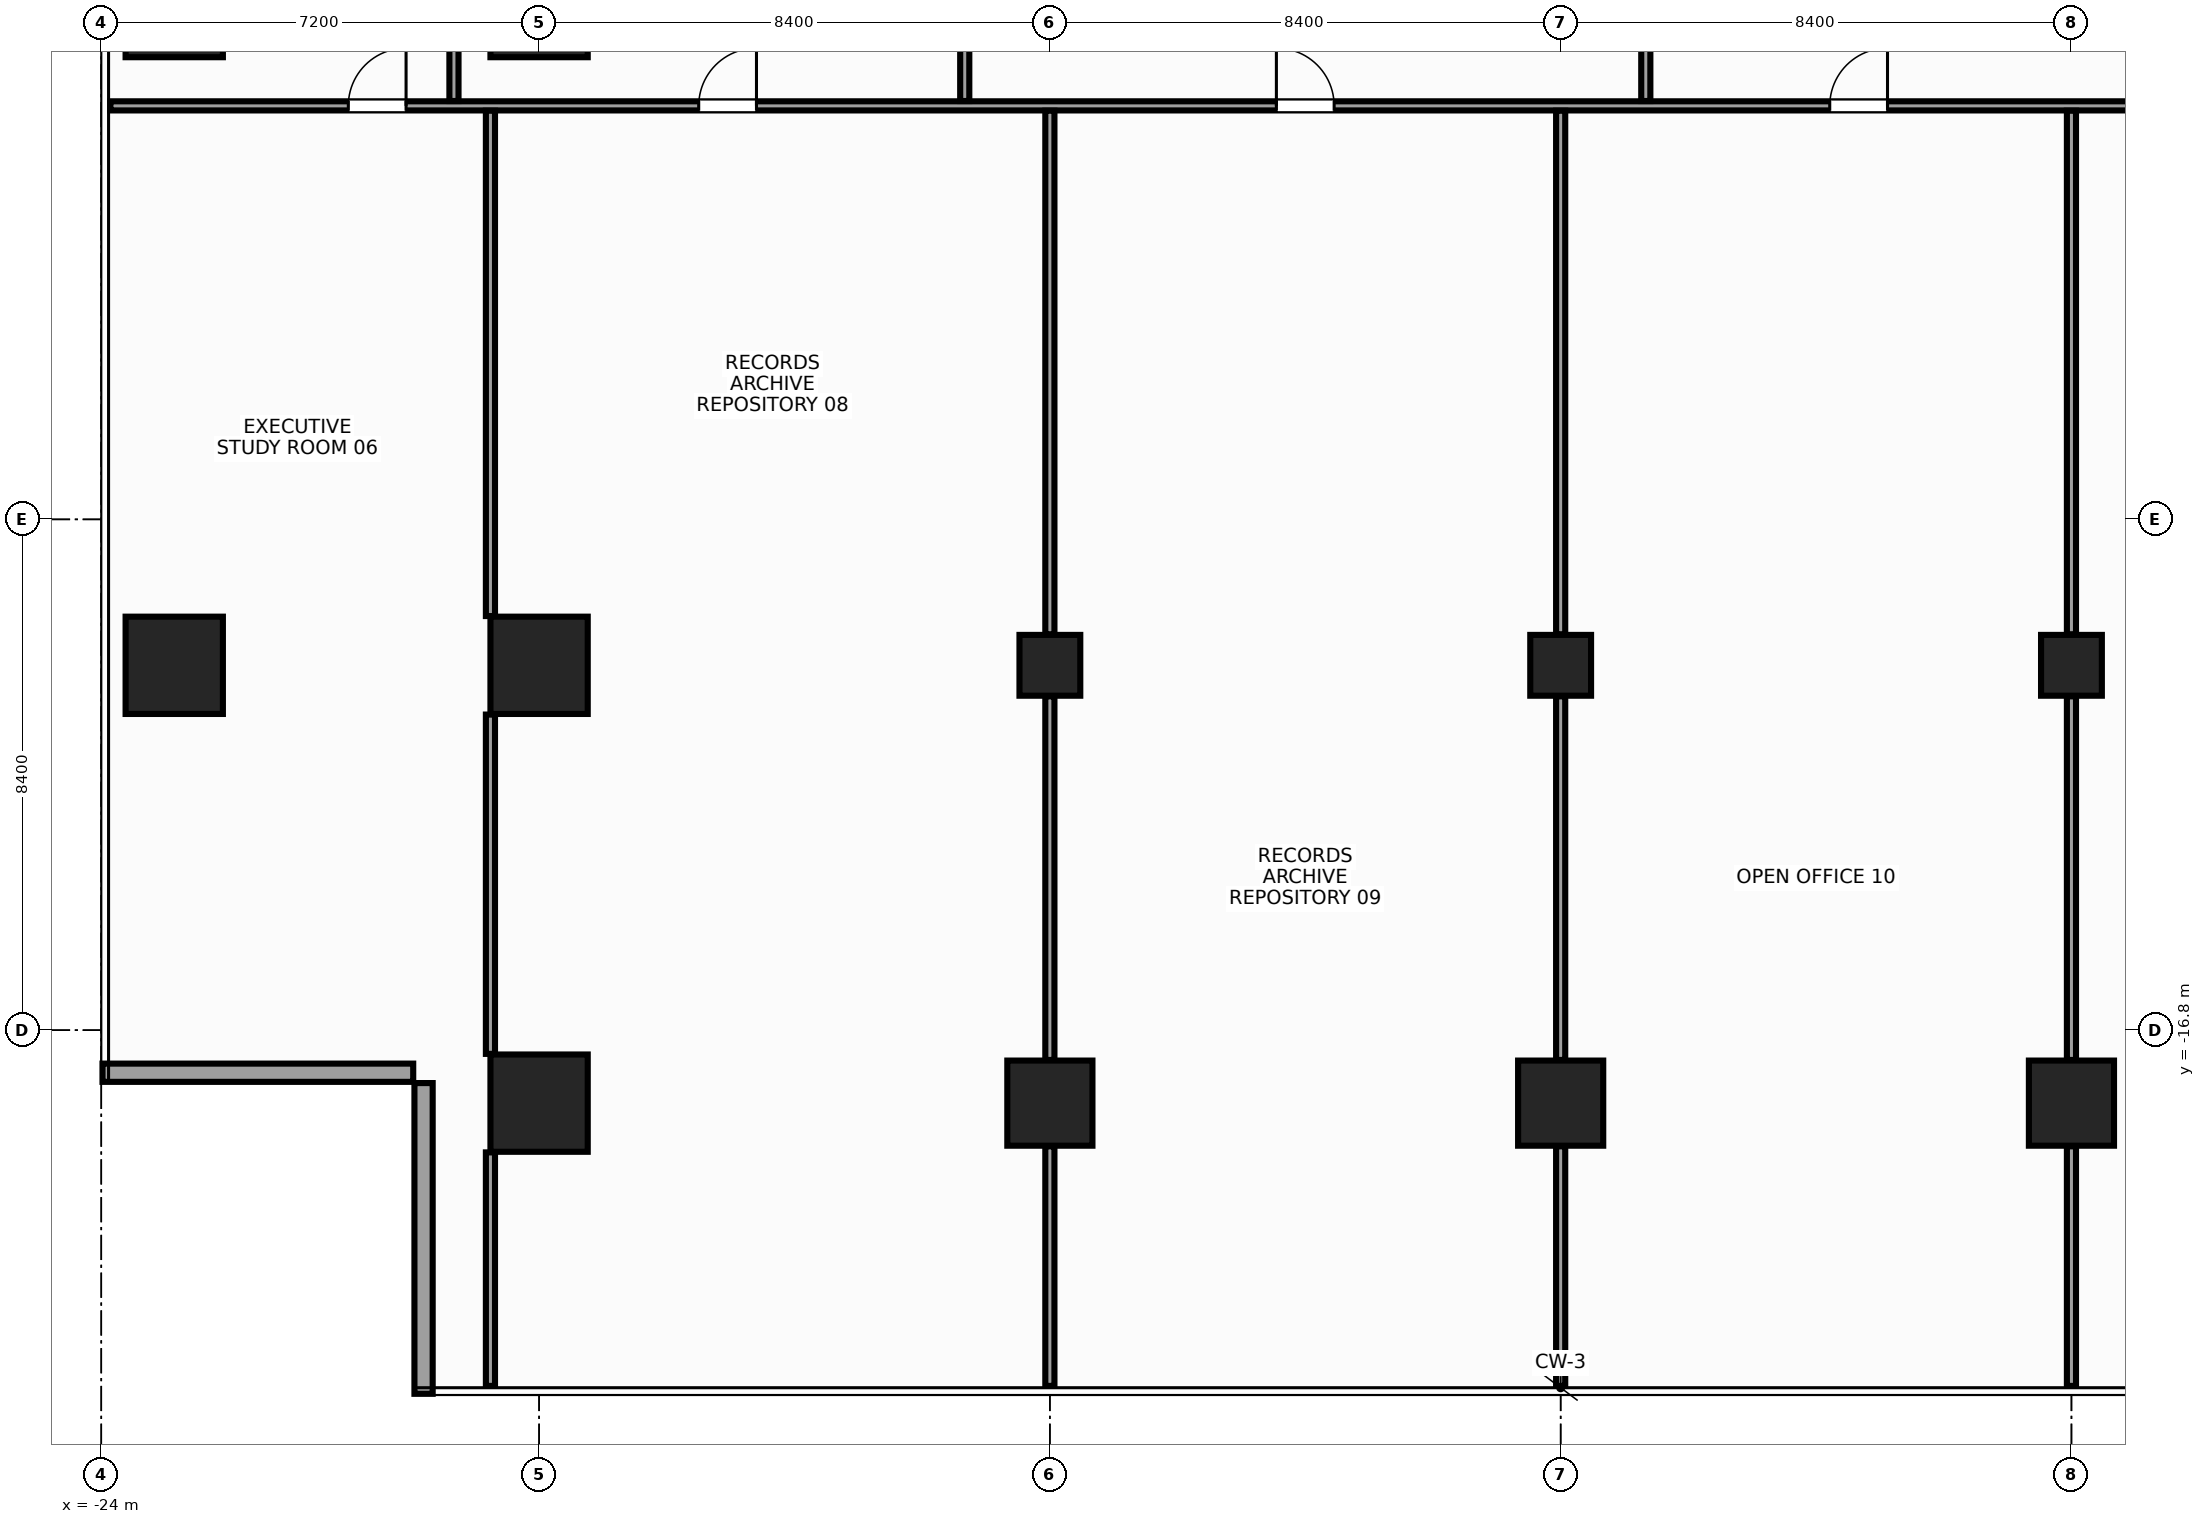
"""IFC4 building model, lengths in metres.
Left out: names, types, materials, properties, quantities, classifications, styles, units other than length and angle.
Written with IfcOpenShell. Run it as: python <this file> out.ifc"""

import sys

from ifc_helpers import new_model, si_unit, direction, frame, frame_2d, origin, origin_2d, place, context, subcontext, project, spatial, rectangle, hollow_rectangle, extrude, source, transform, mapped, element, fill, save


model = new_model("IFC4")
c1 = context("Model", 3, precision=1e-05, world=origin(), true_north=direction((0.0, 1.0)))
c2 = subcontext(c1, "Body", "Model", "MODEL_VIEW")
j1 = project(units=[si_unit("LENGTHUNIT", "METRE"), si_unit("PLANEANGLEUNIT", "RADIAN")], contexts=[c1])
p1 = place(None, origin())
s1 = spatial("IfcSite", under=j1, at=p1, CompositionType="ELEMENT")
p2 = place(p1, origin())
s2 = spatial("IfcBuilding", under=s1, at=p2, CompositionType="ELEMENT")
p3 = place(p2, frame((0.0, 0.0, 149.6)))
s3 = spatial("IfcBuildingStorey", under=s2, at=p3, CompositionType="ELEMENT", Elevation=149.6)
m1 = source(origin(), c2, "Body", "SweptSolid", [
    extrude(rectangle(XDim=1.6, YDim=1.6, at=origin_2d()), origin(), (0.0, 0.0, 1.0), 3.6),
])
for number, where, z_axis, x_axis in (
    (1, (-16.8, -18.0, 0.0), (0.0, 0.0, 1.0), (1.0, 0.0, 0.0)),
    (2, (-16.8, -10.8, 0.0), (0.0, 0.0, 1.0), (1.0, 0.0, 0.0)),
    (3, (-16.8, 0.0, 0.0), (0.0, 0.0, 1.0), (1.0, 0.0, 0.0)),
    (4, (-22.8, -10.8, 0.0), (0.0, 0.0, 1.0), (1.0, 0.0, 0.0)),
    (5, (-22.8, 0.0, 0.0), (0.0, 0.0, 1.0), (1.0, 0.0, 0.0)),
):
    element("IfcColumn", number, at=place(p3, frame(where, z_axis=z_axis, x_axis=x_axis)), inside=s3, PredefinedType="COLUMN", context=c2, shape_type="MappedRepresentation", body=[
        mapped(m1, transform((0.0, 0.0, 0.0), x_axis=(1.0, 0.0, 0.0), y_axis=(0.0, 1.0, 0.0), z_axis=(0.0, 0.0, 1.0), scale=1.0)),
    ])
m2 = source(origin(), c2, "Body", "SweptSolid", [
    extrude(rectangle(XDim=1.4, YDim=1.4, at=origin_2d()), origin(), (0.0, 0.0, 1.0), 3.6),
])
p4 = place(p3, frame((-8.4, -18.0, 0.0), z_axis=(0.0, 0.0, 1.0), x_axis=(1.0, 0.0, 0.0)))
e6 = element("IfcColumn", 6, at=p4, inside=s3, PredefinedType="COLUMN", context=c2, shape_type="MappedRepresentation", body=[
    mapped(m2, transform((0.0, 0.0, 0.0), x_axis=(1.0, 0.0, 0.0), y_axis=(0.0, 1.0, 0.0), z_axis=(0.0, 0.0, 1.0), scale=1.0)),
])
m3 = source(origin(), c2, "Body", "SweptSolid", [
    extrude(hollow_rectangle(XDim=1.0, YDim=1.0, WallThickness=0.045, at=origin_2d()), origin(), (0.0, 0.0, 1.0), 3.6),
])
p5 = place(p3, frame((-8.4, -10.8, 0.0), z_axis=(0.0, 0.0, 1.0), x_axis=(1.0, 0.0, 0.0)))
e7 = element("IfcColumn", 7, at=p5, inside=s3, PredefinedType="COLUMN", context=c2, shape_type="MappedRepresentation", body=[
    mapped(m3, transform((0.0, 0.0, 0.0), x_axis=(1.0, 0.0, 0.0), y_axis=(0.0, 1.0, 0.0), z_axis=(0.0, 0.0, 1.0), scale=1.0)),
])
p6 = place(p3, frame((8.4, -18.0, 0.0), z_axis=(0.0, 0.0, 1.0), x_axis=(1.0, 0.0, 0.0)))
e8 = element("IfcColumn", 8, at=p6, inside=s3, PredefinedType="COLUMN", context=c2, shape_type="MappedRepresentation", body=[
    mapped(m2, transform((0.0, 0.0, 0.0), x_axis=(1.0, 0.0, 0.0), y_axis=(0.0, 1.0, 0.0), z_axis=(0.0, 0.0, 1.0), scale=1.0)),
])
p7 = place(p3, frame((8.4, -10.8, 0.0), z_axis=(0.0, 0.0, 1.0), x_axis=(1.0, 0.0, 0.0)))
e9 = element("IfcColumn", 9, at=p7, inside=s3, PredefinedType="COLUMN", context=c2, shape_type="MappedRepresentation", body=[
    mapped(m3, transform((0.0, 0.0, 0.0), x_axis=(1.0, 0.0, 0.0), y_axis=(0.0, 1.0, 0.0), z_axis=(0.0, 0.0, 1.0), scale=1.0)),
])
p8 = place(p3, frame((0.0, -18.0, 0.0), z_axis=(0.0, 0.0, 1.0), x_axis=(1.0, 0.0, 0.0)))
e10 = element("IfcColumn", 10, at=p8, inside=s3, PredefinedType="COLUMN", context=c2, shape_type="MappedRepresentation", body=[
    mapped(m2, transform((0.0, 0.0, 0.0), x_axis=(1.0, 0.0, 0.0), y_axis=(0.0, 1.0, 0.0), z_axis=(0.0, 0.0, 1.0), scale=1.0)),
])
m4 = source(origin(), c2, "Body", "SweptSolid", [
    extrude(rectangle(XDim=1.0, YDim=1.0, at=origin_2d()), origin(), (0.0, 0.0, 1.0), 3.6),
])
p9 = place(p3, frame((0.0, -10.8, 0.0), z_axis=(0.0, 0.0, 1.0), x_axis=(1.0, 0.0, 0.0)))
e11 = element("IfcColumn", 11, at=p9, inside=s3, PredefinedType="COLUMN", context=c2, shape_type="MappedRepresentation", body=[
    mapped(m4, transform((0.0, 0.0, 0.0), x_axis=(1.0, 0.0, 0.0), y_axis=(0.0, 1.0, 0.0), z_axis=(0.0, 0.0, 1.0), scale=1.0)),
])
m5 = source(origin(), c2, "Body", "SweptSolid", [
    extrude(rectangle(XDim=5.11, YDim=0.3, at=frame_2d((2.555, 0.0))), origin(), (0.0, 0.0, 1.0), 2.76),
])
p10 = place(p3, frame((-23.98, -17.5, 0.0), z_axis=(0.0, 0.0, 1.0), x_axis=(1.0, 0.0, 0.0)))
e12 = element("IfcWall", 12, at=p10, inside=s3, PredefinedType="STANDARD", context=c2, shape_type="MappedRepresentation", body=[
    mapped(m5, transform((0.0, 0.0, 0.0), x_axis=(1.0, 0.0, 0.0), y_axis=(0.0, 1.0, 0.0), z_axis=(0.0, 0.0, 1.0), scale=1.0)),
])
m6 = source(origin(), c2, "Body", "SweptSolid", [
    extrude(rectangle(XDim=5.11, YDim=0.3, at=frame_2d((2.555, 0.0))), origin(), (0.0, 0.0, 1.0), 2.76),
])
p11 = place(p3, frame((-18.7, -17.67, 0.0), z_axis=(0.0, 0.0, 1.0), x_axis=(0.0, -1.0, 0.0)))
e13 = element("IfcWall", 13, at=p11, inside=s3, PredefinedType="STANDARD", context=c2, shape_type="MappedRepresentation", body=[
    mapped(m6, transform((0.0, 0.0, 0.0), x_axis=(1.0, 0.0, 0.0), y_axis=(0.0, 1.0, 0.0), z_axis=(0.0, 0.0, 1.0), scale=1.0)),
])
m7 = source(origin(), c2, "Body", "SweptSolid", [
    extrude(rectangle(XDim=34.895, YDim=0.15, at=frame_2d((17.448, 0.0))), origin(), (0.0, 0.0, 1.0), 2.765),
])
p12 = place(p3, frame((-23.85, -1.6, 0.0), z_axis=(0.0, 0.0, 1.0), x_axis=(1.0, 0.0, 0.0)))
e14 = element("IfcWall", 14, at=p12, inside=s3, PredefinedType="PARTITIONING", context=c2, shape_type="MappedRepresentation", body=[
    mapped(m7, transform((0.0, 0.0, 0.0), x_axis=(1.0, 0.0, 0.0), y_axis=(0.0, 1.0, 0.0), z_axis=(0.0, 0.0, 1.0), scale=1.0)),
])
p13 = place(p12, frame((3.913, 0.0, 0.0)))
e15 = element("IfcOpeningElement", 15, at=p13, cuts=e14, PredefinedType="OPENING", context=c2, shape_type="SweptSolid", body=[
    extrude(rectangle(XDim=0.95, YDim=2.15, at=frame_2d((0.475, 1.075))), frame((0.0, 0.087, 0.0), z_axis=(0.0, -1.0, 0.0), x_axis=(1.0, 0.0, 0.0)), (0.0, 0.0, 1.0), 0.174),
])
p14 = place(p12, frame((9.675, 0.0, 0.0)))
e16 = element("IfcOpeningElement", 16, at=p14, cuts=e14, PredefinedType="OPENING", context=c2, shape_type="SweptSolid", body=[
    extrude(rectangle(XDim=0.95, YDim=2.15, at=frame_2d((0.475, 1.075))), frame((0.0, 0.087, 0.0), z_axis=(0.0, -1.0, 0.0), x_axis=(1.0, 0.0, 0.0)), (0.0, 0.0, 1.0), 0.174),
])
p15 = place(p12, frame((19.175, 0.0, 0.0)))
e17 = element("IfcOpeningElement", 17, at=p15, cuts=e14, PredefinedType="OPENING", context=c2, shape_type="SweptSolid", body=[
    extrude(rectangle(XDim=0.95, YDim=2.15, at=frame_2d((0.475, 1.075))), frame((0.0, 0.087, 0.0), z_axis=(0.0, -1.0, 0.0), x_axis=(1.0, 0.0, 0.0)), (0.0, 0.0, 1.0), 0.174),
])
p16 = place(p12, frame((28.275, 0.0, 0.0)))
e18 = element("IfcOpeningElement", 18, at=p16, cuts=e14, PredefinedType="OPENING", context=c2, shape_type="SweptSolid", body=[
    extrude(rectangle(XDim=0.95, YDim=2.15, at=frame_2d((0.475, 1.075))), frame((0.0, 0.087, 0.0), z_axis=(0.0, -1.0, 0.0), x_axis=(1.0, 0.0, 0.0)), (0.0, 0.0, 1.0), 0.174),
])
m8 = source(origin(), c2, "Body", "SweptSolid", [
    extrude(rectangle(XDim=9.165, YDim=0.15, at=frame_2d((4.583, 0.0))), origin(), (0.0, 0.0, 1.0), 2.915),
])
p17 = place(p3, frame((-18.2, -1.52, 0.0), z_axis=(0.0, 0.0, 1.0), x_axis=(0.0, 1.0, 0.0)))
e19 = element("IfcWall", 19, at=p17, inside=s3, PredefinedType="PARTITIONING", context=c2, shape_type="MappedRepresentation", body=[
    mapped(m8, transform((0.0, 0.0, 0.0), x_axis=(1.0, 0.0, 0.0), y_axis=(0.0, 1.0, 0.0), z_axis=(0.0, 0.0, 1.0), scale=1.0)),
])
m9 = source(origin(), c2, "Body", "SweptSolid", [
    extrude(rectangle(XDim=9.165, YDim=0.15, at=frame_2d((4.583, 0.0))), origin(), (0.0, 0.0, 1.0), 2.665),
])
for number, where, z_axis, x_axis in (
    (20, (-9.8, -1.52, 0.0), (0.0, 0.0, 1.0), (0.0, 1.0, 0.0)),
    (21, (1.4, -1.52, 0.0), (0.0, 0.0, 1.0), (0.0, 1.0, 0.0)),
):
    element("IfcWall", number, at=place(p3, frame(where, z_axis=z_axis, x_axis=x_axis)), inside=s3, PredefinedType="PARTITIONING", context=c2, shape_type="MappedRepresentation", body=[
        mapped(m9, transform((0.0, 0.0, 0.0), x_axis=(1.0, 0.0, 0.0), y_axis=(0.0, 1.0, 0.0), z_axis=(0.0, 0.0, 1.0), scale=1.0)),
    ])
m10 = source(origin(), c2, "Body", "SweptSolid", [
    extrude(rectangle(XDim=3.84, YDim=0.15, at=frame_2d((1.92, 0.0))), origin(), (0.0, 0.0, 1.0), 3.38),
])
p18 = place(p3, frame((-17.6, -22.65, 0.0), z_axis=(0.0, 0.0, 1.0), x_axis=(0.0, 1.0, 0.0)))
e22 = element("IfcWall", 22, at=p18, inside=s3, PredefinedType="PARTITIONING", context=c2, shape_type="MappedRepresentation", body=[
    mapped(m10, transform((0.0, 0.0, 0.0), x_axis=(1.0, 0.0, 0.0), y_axis=(0.0, 1.0, 0.0), z_axis=(0.0, 0.0, 1.0), scale=1.0)),
])
m11 = source(origin(), c2, "Body", "SweptSolid", [
    extrude(rectangle(XDim=5.58, YDim=0.15, at=frame_2d((2.79, 0.0))), origin(), (0.0, 0.0, 1.0), 3.38),
])
p19 = place(p3, frame((-17.6, -17.19, 0.0), z_axis=(0.0, 0.0, 1.0), x_axis=(0.0, 1.0, 0.0)))
e23 = element("IfcWall", 23, at=p19, inside=s3, PredefinedType="PARTITIONING", context=c2, shape_type="MappedRepresentation", body=[
    mapped(m11, transform((0.0, 0.0, 0.0), x_axis=(1.0, 0.0, 0.0), y_axis=(0.0, 1.0, 0.0), z_axis=(0.0, 0.0, 1.0), scale=1.0)),
])
m12 = source(origin(), c2, "Body", "SweptSolid", [
    extrude(rectangle(XDim=8.31, YDim=0.15, at=frame_2d((4.155, 0.0))), origin(), (0.0, 0.0, 1.0), 3.38),
])
p20 = place(p3, frame((-17.6, -9.99, 0.0), z_axis=(0.0, 0.0, 1.0), x_axis=(0.0, 1.0, 0.0)))
e24 = element("IfcWall", 24, at=p20, inside=s3, PredefinedType="PARTITIONING", context=c2, shape_type="MappedRepresentation", body=[
    mapped(m12, transform((0.0, 0.0, 0.0), x_axis=(1.0, 0.0, 0.0), y_axis=(0.0, 1.0, 0.0), z_axis=(0.0, 0.0, 1.0), scale=1.0)),
])
m13 = source(origin(), c2, "Body", "SweptSolid", [
    extrude(rectangle(XDim=3.94, YDim=0.15, at=frame_2d((1.97, 0.0))), origin(), (0.0, 0.0, 1.0), 3.38),
])
p21 = place(p3, frame((-8.4, -22.65, 0.0), z_axis=(0.0, 0.0, 1.0), x_axis=(0.0, 1.0, 0.0)))
e25 = element("IfcWall", 25, at=p21, inside=s3, PredefinedType="PARTITIONING", context=c2, shape_type="MappedRepresentation", body=[
    mapped(m13, transform((0.0, 0.0, 0.0), x_axis=(1.0, 0.0, 0.0), y_axis=(0.0, 1.0, 0.0), z_axis=(0.0, 0.0, 1.0), scale=1.0)),
])
m14 = source(origin(), c2, "Body", "SweptSolid", [
    extrude(rectangle(XDim=5.98, YDim=0.15, at=frame_2d((2.99, 0.0))), origin(), (0.0, 0.0, 1.0), 2.965),
])
p22 = place(p3, frame((-8.4, -17.29, 0.0), z_axis=(0.0, 0.0, 1.0), x_axis=(0.0, 1.0, 0.0)))
e26 = element("IfcWall", 26, at=p22, inside=s3, PredefinedType="PARTITIONING", context=c2, shape_type="MappedRepresentation", body=[
    mapped(m14, transform((0.0, 0.0, 0.0), x_axis=(1.0, 0.0, 0.0), y_axis=(0.0, 1.0, 0.0), z_axis=(0.0, 0.0, 1.0), scale=1.0)),
])
m15 = source(origin(), c2, "Body", "SweptSolid", [
    extrude(rectangle(XDim=8.61, YDim=0.15, at=frame_2d((4.305, 0.0))), origin(), (0.0, 0.0, 1.0), 2.765),
])
p23 = place(p3, frame((-8.4, -10.29, 0.0), z_axis=(0.0, 0.0, 1.0), x_axis=(0.0, 1.0, 0.0)))
e27 = element("IfcWall", 27, at=p23, inside=s3, PredefinedType="PARTITIONING", context=c2, shape_type="MappedRepresentation", body=[
    mapped(m15, transform((0.0, 0.0, 0.0), x_axis=(1.0, 0.0, 0.0), y_axis=(0.0, 1.0, 0.0), z_axis=(0.0, 0.0, 1.0), scale=1.0)),
])
p24 = place(p3, frame((0.0, -22.65, 0.0), z_axis=(0.0, 0.0, 1.0), x_axis=(0.0, 1.0, 0.0)))
e28 = element("IfcWall", 28, at=p24, inside=s3, PredefinedType="PARTITIONING", context=c2, shape_type="MappedRepresentation", body=[
    mapped(m13, transform((0.0, 0.0, 0.0), x_axis=(1.0, 0.0, 0.0), y_axis=(0.0, 1.0, 0.0), z_axis=(0.0, 0.0, 1.0), scale=1.0)),
])
p25 = place(p3, frame((0.0, -17.29, 0.0), z_axis=(0.0, 0.0, 1.0), x_axis=(0.0, 1.0, 0.0)))
e29 = element("IfcWall", 29, at=p25, inside=s3, PredefinedType="PARTITIONING", context=c2, shape_type="MappedRepresentation", body=[
    mapped(m14, transform((0.0, 0.0, 0.0), x_axis=(1.0, 0.0, 0.0), y_axis=(0.0, 1.0, 0.0), z_axis=(0.0, 0.0, 1.0), scale=1.0)),
])
p26 = place(p3, frame((0.0, -10.29, 0.0), z_axis=(0.0, 0.0, 1.0), x_axis=(0.0, 1.0, 0.0)))
e30 = element("IfcWall", 30, at=p26, inside=s3, PredefinedType="PARTITIONING", context=c2, shape_type="MappedRepresentation", body=[
    mapped(m15, transform((0.0, 0.0, 0.0), x_axis=(1.0, 0.0, 0.0), y_axis=(0.0, 1.0, 0.0), z_axis=(0.0, 0.0, 1.0), scale=1.0)),
])
p27 = place(p3, frame((8.4, -22.65, 0.0), z_axis=(0.0, 0.0, 1.0), x_axis=(0.0, 1.0, 0.0)))
e31 = element("IfcWall", 31, at=p27, inside=s3, PredefinedType="PARTITIONING", context=c2, shape_type="MappedRepresentation", body=[
    mapped(m13, transform((0.0, 0.0, 0.0), x_axis=(1.0, 0.0, 0.0), y_axis=(0.0, 1.0, 0.0), z_axis=(0.0, 0.0, 1.0), scale=1.0)),
])
p28 = place(p3, frame((8.4, -17.29, 0.0), z_axis=(0.0, 0.0, 1.0), x_axis=(0.0, 1.0, 0.0)))
e32 = element("IfcWall", 32, at=p28, inside=s3, PredefinedType="PARTITIONING", context=c2, shape_type="MappedRepresentation", body=[
    mapped(m14, transform((0.0, 0.0, 0.0), x_axis=(1.0, 0.0, 0.0), y_axis=(0.0, 1.0, 0.0), z_axis=(0.0, 0.0, 1.0), scale=1.0)),
])
p29 = place(p3, frame((8.4, -10.29, 0.0), z_axis=(0.0, 0.0, 1.0), x_axis=(0.0, 1.0, 0.0)))
e33 = element("IfcWall", 33, at=p29, inside=s3, PredefinedType="PARTITIONING", context=c2, shape_type="MappedRepresentation", body=[
    mapped(m15, transform((0.0, 0.0, 0.0), x_axis=(1.0, 0.0, 0.0), y_axis=(0.0, 1.0, 0.0), z_axis=(0.0, 0.0, 1.0), scale=1.0)),
])
m16 = source(origin(), c2, "Body", "SweptSolid", [
    extrude(rectangle(XDim=0.95, YDim=2.15, at=frame_2d((0.475, 1.075))), frame((0.0, 0.025, 0.0), z_axis=(0.0, -1.0, 0.0), x_axis=(1.0, 0.0, 0.0)), (0.0, 0.0, 1.0), 0.05),
])
p30 = place(p13, origin())
e34 = element("IfcDoor", 34, at=p30, inside=s3, OperationType="SINGLE_SWING_RIGHT", PredefinedType="DOOR", context=c2, shape_type="MappedRepresentation", body=[
    mapped(m16, transform((0.0, 0.0, 0.0), x_axis=(1.0, 0.0, 0.0), y_axis=(0.0, 1.0, 0.0), z_axis=(0.0, 0.0, 1.0), scale=1.0)),
])
fill(e15, e34)
p31 = place(p14, origin())
e35 = element("IfcDoor", 35, at=p31, inside=s3, OperationType="SINGLE_SWING_RIGHT", PredefinedType="DOOR", context=c2, shape_type="MappedRepresentation", body=[
    mapped(m16, transform((0.0, 0.0, 0.0), x_axis=(1.0, 0.0, 0.0), y_axis=(0.0, 1.0, 0.0), z_axis=(0.0, 0.0, 1.0), scale=1.0)),
])
fill(e16, e35)
p32 = place(p15, origin())
e36 = element("IfcDoor", 36, at=p32, inside=s3, OperationType="SINGLE_SWING_LEFT", PredefinedType="DOOR", context=c2, shape_type="MappedRepresentation", body=[
    mapped(m16, transform((0.0, 0.0, 0.0), x_axis=(1.0, 0.0, 0.0), y_axis=(0.0, 1.0, 0.0), z_axis=(0.0, 0.0, 1.0), scale=1.0)),
])
fill(e17, e36)
p33 = place(p16, origin())
e37 = element("IfcDoor", 37, at=p33, inside=s3, OperationType="SINGLE_SWING_RIGHT", PredefinedType="DOOR", context=c2, shape_type="MappedRepresentation", body=[
    mapped(m16, transform((0.0, 0.0, 0.0), x_axis=(1.0, 0.0, 0.0), y_axis=(0.0, 1.0, 0.0), z_axis=(0.0, 0.0, 1.0), scale=1.0)),
])
fill(e18, e37)
save(model, sys.argv[1])
